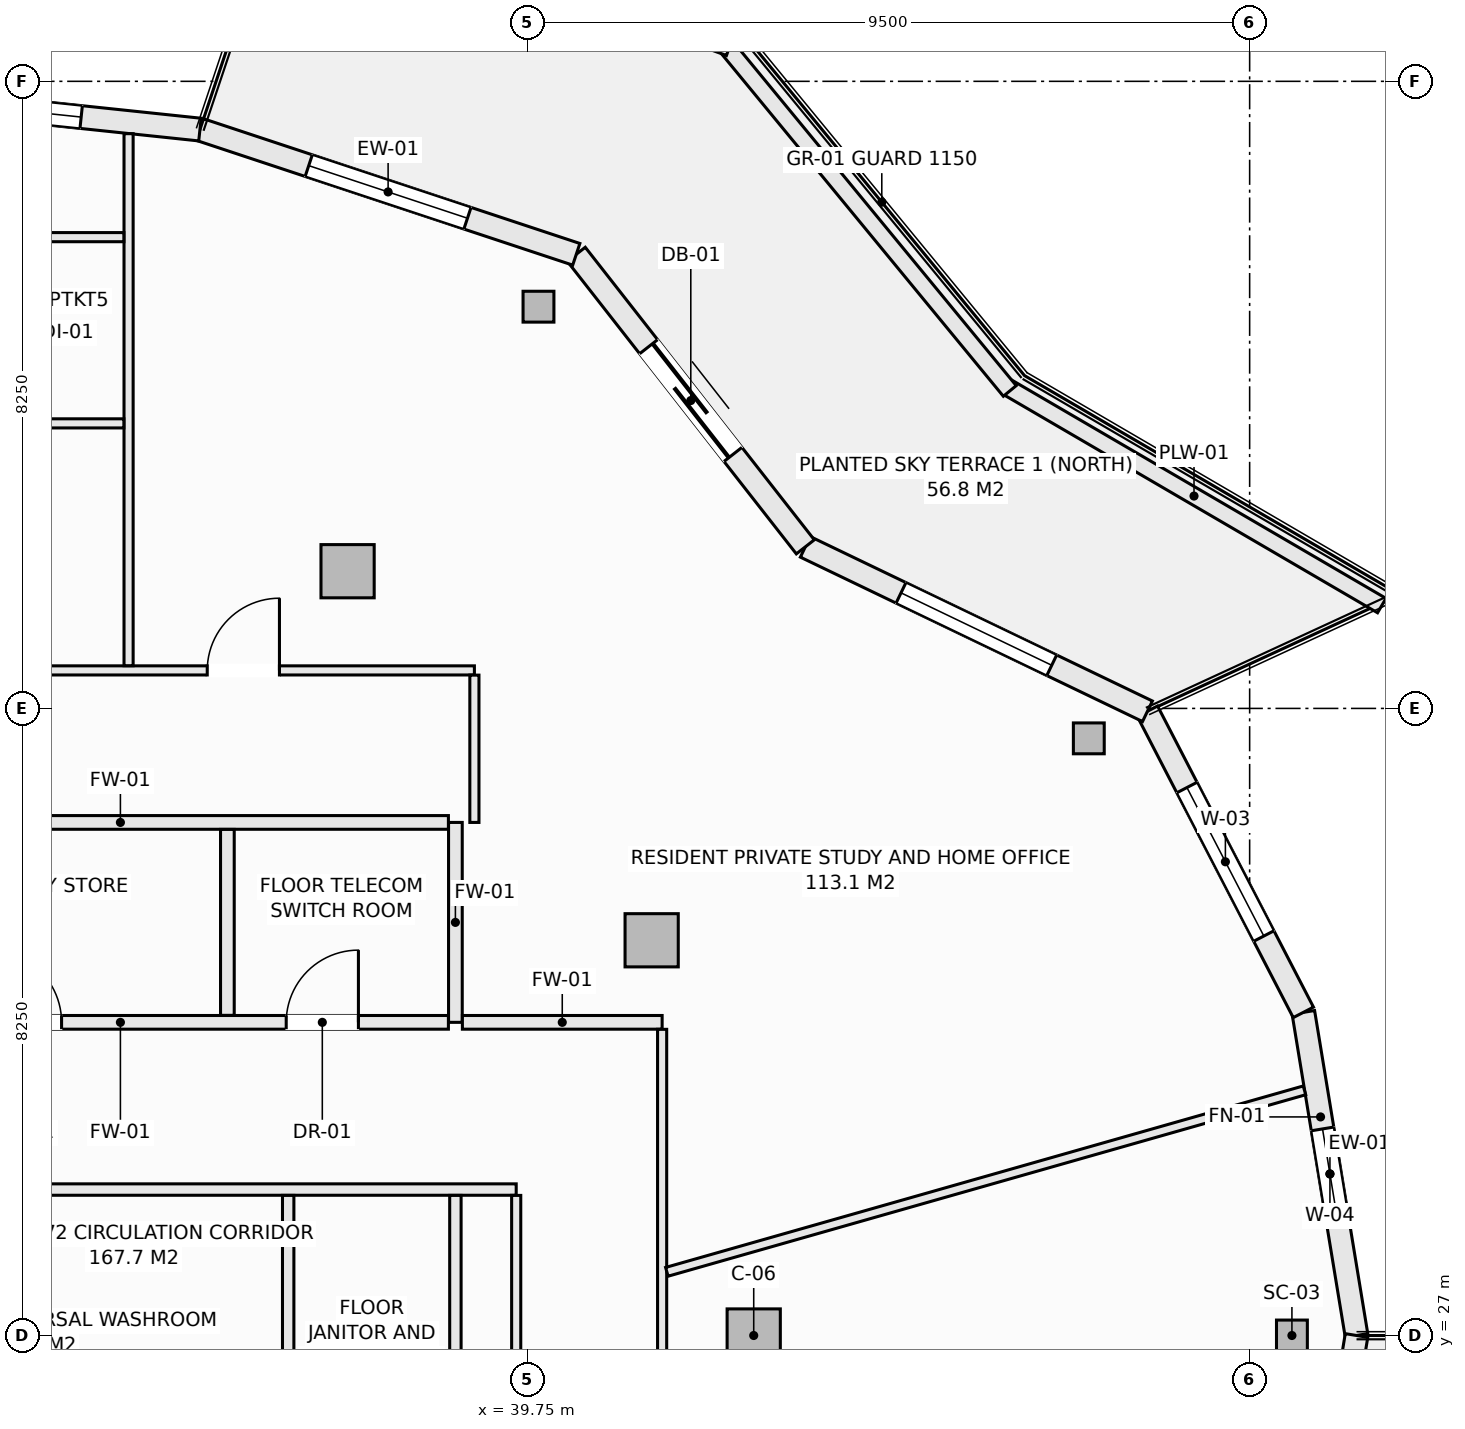
"""IFC4 building model, lengths in metres.
Left out: names, types, materials, properties, quantities, classifications, styles, units other than length and angle.
Written with IfcOpenShell. Run it as: python <this file> out.ifc"""

import sys

from ifc_helpers import new_model, si_unit, direction, frame, frame_2d, origin, origin_2d, place, context, subcontext, project, spatial, rectangle, hollow_rectangle, extrude, element, fill, save


model = new_model("IFC4")
c1 = context("Model", 3, precision=1e-05, world=origin(), true_north=direction((0.0, 1.0)))
c2 = subcontext(c1, "Body", "Model", "MODEL_VIEW")
j1 = project(units=[si_unit("LENGTHUNIT", "METRE"), si_unit("PLANEANGLEUNIT", "RADIAN")], contexts=[c1])
p1 = place(None, origin())
s1 = spatial("IfcSite", under=j1, at=p1, CompositionType="ELEMENT")
p2 = place(p1, origin())
s2 = spatial("IfcBuilding", under=s1, at=p2, CompositionType="ELEMENT")
p3 = place(p2, frame((0.0, 0.0, 265.7)))
s3 = spatial("IfcBuildingStorey", under=s2, at=p3, CompositionType="ELEMENT", Elevation=265.7)
for number, where, z_axis, x_axis in (
    (1, (49.806, 27.0, -0.27), (0.0, 0.0, 1.0), (1.0, 0.0, 0.0)),
    (2, (47.134, 34.856, -0.27), (0.0, 0.0, 1.0), (1.0, 0.0, 0.0)),
    (3, (39.893, 40.535, -0.27), (0.0, 0.0, 1.0), (1.0, 0.0, 0.0)),
):
    element("IfcColumn", number, at=place(p3, frame(where, z_axis=z_axis, x_axis=x_axis)), inside=s3, PredefinedType="COLUMN", context=c2, shape_type="SweptSolid", body=[
        extrude(hollow_rectangle(XDim=0.406, YDim=0.406, WallThickness=0.016, at=origin_2d()), origin(), (0.0, 0.0, 1.0), 3.3),
    ])
for number, where, z_axis, x_axis in (
    (4, (42.725, 27.0, -0.27), (0.0, 0.0, 1.0), (1.0, 0.0, 0.0)),
    (5, (41.382, 32.199, -0.27), (0.0, 0.0, 1.0), (1.0, 0.0, 0.0)),
    (6, (37.382, 37.055, -0.27), (0.0, 0.0, 1.0), (1.0, 0.0, 0.0)),
):
    element("IfcColumn", number, at=place(p3, frame(where, z_axis=z_axis, x_axis=x_axis)), inside=s3, PredefinedType="COLUMN", context=c2, shape_type="SweptSolid", body=[
        extrude(rectangle(XDim=0.7, YDim=0.7, at=origin_2d()), origin(), (0.0, 0.0, 1.0), 3.3),
    ])
p4 = place(p3, frame((49.957, 31.251, 0.0), z_axis=(0.0, 0.0, 1.0), x_axis=(0.162404622434, -0.98672424649, 0.0)))
e7 = element("IfcWall", 7, at=p4, inside=s3, PredefinedType="SOLIDWALL", context=c2, shape_type="SweptSolid", body=[
    extrude(rectangle(XDim=4.308, YDim=0.3, at=frame_2d((2.154, 0.0))), origin(), (0.0, 0.0, 1.0), 2.605),
])
p5 = place(p4, frame((1.554, 0.0, 0.72)))
e8 = element("IfcOpeningElement", 8, at=p5, cuts=e7, PredefinedType="OPENING", context=c2, shape_type="SweptSolid", body=[
    extrude(rectangle(XDim=1.2, YDim=1.65, at=frame_2d((0.6, 0.825))), frame((0.0, 0.16, 0.0), z_axis=(0.0, -1.0, 0.0), x_axis=(1.0, 0.0, 0.0)), (0.0, 0.0, 1.0), 0.32),
])
p6 = place(p3, frame((47.906, 35.212, 0.0), z_axis=(0.0, 0.0, 1.0), x_axis=(0.459801070243, -0.888021945564, 0.0)))
e9 = element("IfcWall", 9, at=p6, inside=s3, PredefinedType="SOLIDWALL", context=c2, shape_type="SweptSolid", body=[
    extrude(rectangle(XDim=4.461, YDim=0.3, at=frame_2d((2.23, 0.0))), origin(), (0.0, 0.0, 1.0), 2.605),
])
p7 = place(p6, frame((1.13, 0.0, 0.72)))
e10 = element("IfcOpeningElement", 10, at=p7, cuts=e9, PredefinedType="OPENING", context=c2, shape_type="SweptSolid", body=[
    extrude(rectangle(XDim=2.2, YDim=1.65, at=frame_2d((1.1, 0.825))), frame((0.0, 0.16, 0.0), z_axis=(0.0, -1.0, 0.0), x_axis=(1.0, 0.0, 0.0)), (0.0, 0.0, 1.0), 0.32),
])
p8 = place(p3, frame((43.404, 37.375, 0.0), z_axis=(0.0, 0.0, 1.0), x_axis=(0.901346013132, -0.433099716706, 0.0)))
e11 = element("IfcWall", 11, at=p8, inside=s3, PredefinedType="SOLIDWALL", context=c2, shape_type="SweptSolid", body=[
    extrude(rectangle(XDim=4.994, YDim=0.3, at=frame_2d((2.497, 0.0))), origin(), (0.0, 0.0, 1.0), 2.605),
])
p9 = place(p8, frame((1.397, 0.0, 0.72)))
e12 = element("IfcOpeningElement", 12, at=p9, cuts=e11, PredefinedType="OPENING", context=c2, shape_type="SweptSolid", body=[
    extrude(rectangle(XDim=2.2, YDim=1.65, at=frame_2d((1.1, 0.825))), frame((0.0, 0.16, 0.0), z_axis=(0.0, -1.0, 0.0), x_axis=(1.0, 0.0, 0.0)), (0.0, 0.0, 1.0), 0.32),
])
p10 = place(p3, frame((40.391, 41.225, 0.0), z_axis=(0.0, 0.0, 1.0), x_axis=(0.616413297421, -0.78742278781, 0.0)))
e13 = element("IfcWall", 13, at=p10, inside=s3, PredefinedType="SOLIDWALL", context=c2, shape_type="SweptSolid", body=[
    extrude(rectangle(XDim=4.888, YDim=0.3, at=frame_2d((2.444, 0.0))), origin(), (0.0, 0.0, 1.0), 2.605),
])
p11 = place(p10, frame((1.544, 0.0, 0.0)))
e14 = element("IfcOpeningElement", 14, at=p11, cuts=e13, PredefinedType="OPENING", context=c2, shape_type="SweptSolid", body=[
    extrude(rectangle(XDim=1.8, YDim=2.25, at=frame_2d((0.9, 1.125))), frame((0.0, 0.16, 0.0), z_axis=(0.0, -1.0, 0.0), x_axis=(1.0, 0.0, 0.0)), (0.0, 0.0, 1.0), 0.32),
])
p12 = place(p3, frame((35.439, 42.865, 0.0), z_axis=(0.0, 0.0, 1.0), x_axis=(0.949252744709, -0.314514271001, 0.0)))
e15 = element("IfcWall", 15, at=p12, inside=s3, PredefinedType="SOLIDWALL", context=c2, shape_type="SweptSolid", body=[
    extrude(rectangle(XDim=5.216, YDim=0.3, at=frame_2d((2.608, 0.0))), origin(), (0.0, 0.0, 1.0), 2.605),
])
p13 = place(p12, frame((1.508, 0.0, 0.72)))
e16 = element("IfcOpeningElement", 16, at=p13, cuts=e15, PredefinedType="OPENING", context=c2, shape_type="SweptSolid", body=[
    extrude(rectangle(XDim=2.2, YDim=1.65, at=frame_2d((1.1, 0.825))), frame((0.0, 0.16, 0.0), z_axis=(0.0, -1.0, 0.0), x_axis=(1.0, 0.0, 0.0)), (0.0, 0.0, 1.0), 0.32),
])
p14 = place(p3, frame((30.125, 43.425, 0.0), z_axis=(0.0, 0.0, 1.0), x_axis=(0.9944966869, -0.104768028258, 0.0)))
e17 = element("IfcWall", 17, at=p14, inside=s3, PredefinedType="SOLIDWALL", context=c2, shape_type="SweptSolid", body=[
    extrude(rectangle(XDim=5.343, YDim=0.3, at=frame_2d((2.672, 0.0))), origin(), (0.0, 0.0, 1.0), 2.605),
])
p15 = place(p14, frame((1.572, 0.0, 0.72)))
e18 = element("IfcOpeningElement", 18, at=p15, cuts=e17, PredefinedType="OPENING", context=c2, shape_type="SweptSolid", body=[
    extrude(rectangle(XDim=2.2, YDim=1.65, at=frame_2d((1.1, 0.825))), frame((0.0, 0.16, 0.0), z_axis=(0.0, -1.0, 0.0), x_axis=(1.0, 0.0, 0.0)), (0.0, 0.0, 1.0), 0.32),
])
p16 = place(p3, frame((49.957, 22.749, 0.0), z_axis=(0.0, 0.0, 1.0), x_axis=(0.162404622434, 0.98672424649, 0.0)))
e19 = element("IfcWall", 19, at=p16, inside=s3, PredefinedType="SOLIDWALL", context=c2, shape_type="SweptSolid", body=[
    extrude(rectangle(XDim=4.308, YDim=0.3, at=frame_2d((2.154, 0.0))), origin(), (0.0, 0.0, 1.0), 2.605),
])
p17 = place(p16, frame((1.054, 0.0, 0.72)))
e20 = element("IfcOpeningElement", 20, at=p17, cuts=e19, PredefinedType="OPENING", context=c2, shape_type="SweptSolid", body=[
    extrude(rectangle(XDim=2.2, YDim=1.65, at=frame_2d((1.1, 0.825))), frame((0.0, 0.16, 0.0), z_axis=(0.0, -1.0, 0.0), x_axis=(1.0, 0.0, 0.0)), (0.0, 0.0, 1.0), 0.32),
])
p18 = place(p3, frame((46.048, 39.485, 0.0), z_axis=(0.0, 0.0, 1.0), x_axis=(0.863803671285, -0.503828559606, 0.0)))
e21 = element("IfcWall", 21, at=p18, inside=s3, PredefinedType="PARAPET", context=c2, shape_type="SweptSolid", body=[
    extrude(rectangle(XDim=5.719, YDim=0.22, at=frame_2d((2.86, 0.0))), origin(), (0.0, 0.0, 1.0), 0.52),
])
p19 = place(p3, frame((42.339, 43.99, 0.0), z_axis=(0.0, 0.0, 1.0), x_axis=(0.635450933862, -0.772141250455, 0.0)))
e22 = element("IfcWall", 22, at=p19, inside=s3, PredefinedType="PARAPET", context=c2, shape_type="SweptSolid", body=[
    extrude(rectangle(XDim=5.91, YDim=0.22, at=frame_2d((2.955, 0.0))), origin(), (0.0, 0.0, 1.0), 0.52),
])
p20 = place(p3, frame((36.473, 46.087, 0.0), z_axis=(0.0, 0.0, 1.0), x_axis=(0.940465240036, -0.339889882585, 0.0)))
e23 = element("IfcWall", 23, at=p20, inside=s3, PredefinedType="PARAPET", context=c2, shape_type="SweptSolid", body=[
    extrude(rectangle(XDim=6.307, YDim=0.22, at=frame_2d((3.153, 0.0))), origin(), (0.0, 0.0, 1.0), 0.52),
])
p21 = place(p3, frame((30.077, 28.92, 0.0), z_axis=(0.0, 0.0, 1.0), x_axis=(1.0, 0.0, 0.0)))
e24 = element("IfcWall", 24, at=p21, inside=s3, PredefinedType="PARTITIONING", context=c2, shape_type="SweptSolid", body=[
    extrude(rectangle(XDim=9.523, YDim=0.15, at=frame_2d((4.762, 0.0))), origin(), (0.0, 0.0, 1.0), 3.03),
])
for number, where, z_axis, x_axis in (
    (25, (36.6, 25.197, 0.0), (0.0, 0.0, 1.0), (0.0, 1.0, 0.0)),
    (26, (38.8, 25.197, 0.0), (0.0, 0.0, 1.0), (0.0, 1.0, 0.0)),
):
    element("IfcWall", number, at=place(p3, frame(where, z_axis=z_axis, x_axis=x_axis)), inside=s3, PredefinedType="PARTITIONING", context=c2, shape_type="SweptSolid", body=[
        extrude(rectangle(XDim=3.646, YDim=0.15, at=frame_2d((1.823, 0.0))), origin(), (0.0, 0.0, 1.0), 3.03),
    ])
p22 = place(p3, frame((38.8, 31.12, 0.0), z_axis=(0.0, 0.0, 1.0), x_axis=(0.0, 1.0, 0.0)))
e27 = element("IfcWall", 27, at=p22, inside=s3, PredefinedType="SOLIDWALL", context=c2, shape_type="SweptSolid", body=[
    extrude(rectangle(XDim=2.63, YDim=0.18, at=frame_2d((1.315, 0.0))), origin(), (0.0, 0.0, 1.0), 3.03),
])
p23 = place(p3, frame((30.077, 31.12, 0.0), z_axis=(0.0, 0.0, 1.0), x_axis=(1.0, 0.0, 0.0)))
e28 = element("IfcWall", 28, at=p23, inside=s3, PredefinedType="SOLIDWALL", context=c2, shape_type="SweptSolid", body=[
    extrude(rectangle(XDim=8.631, YDim=0.18, at=frame_2d((4.315, 0.0))), origin(), (0.0, 0.0, 1.0), 3.03),
])
p24 = place(p23, frame((2.592, 0.0, 0.0)))
e29 = element("IfcOpeningElement", 29, at=p24, cuts=e28, PredefinedType="OPENING", context=c2, shape_type="SweptSolid", body=[
    extrude(rectangle(XDim=0.95, YDim=2.1, at=frame_2d((0.475, 1.05))), frame((0.0, 0.1, 0.0), z_axis=(0.0, -1.0, 0.0), x_axis=(1.0, 0.0, 0.0)), (0.0, 0.0, 1.0), 0.2),
])
p25 = place(p23, frame((6.497, 0.0, 0.0)))
e30 = element("IfcOpeningElement", 30, at=p25, cuts=e28, PredefinedType="OPENING", context=c2, shape_type="SweptSolid", body=[
    extrude(rectangle(XDim=0.95, YDim=2.1, at=frame_2d((0.475, 1.05))), frame((0.0, 0.1, 0.0), z_axis=(0.0, -1.0, 0.0), x_axis=(1.0, 0.0, 0.0)), (0.0, 0.0, 1.0), 0.2),
])
p26 = place(p3, frame((38.892, 31.12, 0.0), z_axis=(0.0, 0.0, 1.0), x_axis=(1.0, 0.0, 0.0)))
e31 = element("IfcWall", 31, at=p26, inside=s3, PredefinedType="SOLIDWALL", context=c2, shape_type="SweptSolid", body=[
    extrude(rectangle(XDim=2.628, YDim=0.18, at=frame_2d((1.314, 0.0))), origin(), (0.0, 0.0, 1.0), 3.03),
])
p27 = place(p3, frame((30.077, 33.75, 0.0), z_axis=(0.0, 0.0, 1.0), x_axis=(1.0, 0.0, 0.0)))
e32 = element("IfcWall", 32, at=p27, inside=s3, PredefinedType="SOLIDWALL", context=c2, shape_type="SweptSolid", body=[
    extrude(rectangle(XDim=8.631, YDim=0.18, at=frame_2d((4.315, 0.0))), origin(), (0.0, 0.0, 1.0), 3.03),
])
p28 = place(p3, frame((35.8, 31.212, 0.0), z_axis=(0.0, 0.0, 1.0), x_axis=(0.0, 1.0, 0.0)))
e33 = element("IfcWall", 33, at=p28, inside=s3, PredefinedType="SOLIDWALL", context=c2, shape_type="SweptSolid", body=[
    extrude(rectangle(XDim=2.446, YDim=0.18, at=frame_2d((1.223, 0.0))), origin(), (0.0, 0.0, 1.0), 3.03),
])
p29 = place(p3, frame((30.062, 35.75, 0.0), z_axis=(0.0, 0.0, 1.0), x_axis=(1.0, 0.0, 0.0)))
e34 = element("IfcWall", 34, at=p29, inside=s3, PredefinedType="PARTITIONING", context=c2, shape_type="SweptSolid", body=[
    extrude(rectangle(XDim=8.988, YDim=0.12, at=frame_2d((4.494, 0.0))), origin(), (0.0, 0.0, 1.0), 2.478),
])
p30 = place(p29, frame((5.473, 0.0, 0.0)))
e35 = element("IfcOpeningElement", 35, at=p30, cuts=e34, PredefinedType="OPENING", context=c2, shape_type="SweptSolid", body=[
    extrude(rectangle(XDim=0.95, YDim=2.1, at=frame_2d((0.475, 1.05))), frame((0.0, 0.07, 0.0), z_axis=(0.0, -1.0, 0.0), x_axis=(1.0, 0.0, 0.0)), (0.0, 0.0, 1.0), 0.14),
])
p31 = place(p29, frame((1.949, 0.0, 0.0)))
e36 = element("IfcOpeningElement", 36, at=p31, cuts=e34, PredefinedType="OPENING", context=c2, shape_type="SweptSolid", body=[
    extrude(rectangle(XDim=0.95, YDim=2.1, at=frame_2d((0.475, 1.05))), frame((0.0, 0.07, 0.0), z_axis=(0.0, -1.0, 0.0), x_axis=(1.0, 0.0, 0.0)), (0.0, 0.0, 1.0), 0.14),
])
p32 = place(p3, frame((39.05, 33.75, 0.0), z_axis=(0.0, 0.0, 1.0), x_axis=(0.0, 1.0, 0.0)))
e37 = element("IfcWall", 37, at=p32, inside=s3, PredefinedType="PARTITIONING", context=c2, shape_type="SweptSolid", body=[
    extrude(rectangle(XDim=1.938, YDim=0.12, at=frame_2d((0.969, 0.0))), origin(), (0.0, 0.0, 1.0), 3.03),
])
p33 = place(p3, frame((41.52, 23.02, 0.0), z_axis=(0.0, 0.0, 1.0), x_axis=(0.0, 1.0, 0.0)))
e38 = element("IfcWall", 38, at=p33, inside=s3, PredefinedType="PARTITIONING", context=c2, shape_type="SweptSolid", body=[
    extrude(rectangle(XDim=8.008, YDim=0.12, at=frame_2d((4.004, 0.0))), origin(), (0.0, 0.0, 1.0), 2.478),
])
p34 = place(p33, frame((2.135, 0.0, 0.0)))
e39 = element("IfcOpeningElement", 39, at=p34, cuts=e38, PredefinedType="OPENING", context=c2, shape_type="SweptSolid", body=[
    extrude(rectangle(XDim=0.95, YDim=2.1, at=frame_2d((0.475, 1.05))), frame((0.0, 0.07, 0.0), z_axis=(0.0, -1.0, 0.0), x_axis=(1.0, 0.0, 0.0)), (0.0, 0.0, 1.0), 0.14),
])
p35 = place(p3, frame((39.6, 25.197, 0.0), z_axis=(0.0, 0.0, 1.0), x_axis=(0.0, 1.0, 0.0)))
e40 = element("IfcWall", 40, at=p35, inside=s3, PredefinedType="PARTITIONING", context=c2, shape_type="SweptSolid", body=[
    extrude(rectangle(XDim=3.646, YDim=0.12, at=frame_2d((1.823, 0.0))), origin(), (0.0, 0.0, 1.0), 3.03),
])
p36 = place(p3, frame((34.5, 35.812, 0.0), z_axis=(0.0, 0.0, 1.0), x_axis=(0.0, 1.0, 0.0)))
e41 = element("IfcWall", 41, at=p36, inside=s3, PredefinedType="PARTITIONING", context=c2, shape_type="SweptSolid", body=[
    extrude(rectangle(XDim=6.999, YDim=0.12, at=frame_2d((3.5, 0.0))), origin(), (0.0, 0.0, 1.0), 2.77),
])
p37 = place(p3, frame((41.582, 27.838, 0.0), z_axis=(0.0, 0.0, 1.0), x_axis=(0.961811765236, 0.273711761262, 0.0)))
e42 = element("IfcWall", 42, at=p37, inside=s3, PredefinedType="PARTITIONING", context=c2, shape_type="SweptSolid", body=[
    extrude(rectangle(XDim=8.722, YDim=0.12, at=frame_2d((4.361, 0.0))), origin(), (0.0, 0.0, 1.0), 3.03),
])
p38 = place(p3, frame((32.25, 41.45, 0.0), z_axis=(0.0, 0.0, 1.0), x_axis=(1.0, 0.0, 0.0)))
e43 = element("IfcWall", 43, at=p38, inside=s3, PredefinedType="PARTITIONING", context=c2, shape_type="SweptSolid", body=[
    extrude(rectangle(XDim=2.188, YDim=0.12, at=frame_2d((1.094, 0.0))), origin(), (0.0, 0.0, 1.0), 3.03),
])
p39 = place(p3, frame((32.312, 39.0, 0.0), z_axis=(0.0, 0.0, 1.0), x_axis=(1.0, 0.0, 0.0)))
e44 = element("IfcWall", 44, at=p39, inside=s3, PredefinedType="PARTITIONING", context=c2, shape_type="SweptSolid", body=[
    extrude(rectangle(XDim=2.126, YDim=0.12, at=frame_2d((1.063, 0.0))), origin(), (0.0, 0.0, 1.0), 3.03),
])
p40 = place(p5, origin())
e45 = element("IfcWindow", 45, at=p40, inside=s3, PartitioningType="SINGLE_PANEL", PredefinedType="WINDOW", context=c2, shape_type="SweptSolid", body=[
    extrude(rectangle(XDim=1.2, YDim=1.65, at=frame_2d((0.6, 0.825))), frame((0.0, 0.03, 0.0), z_axis=(0.0, -1.0, 0.0), x_axis=(1.0, 0.0, 0.0)), (0.0, 0.0, 1.0), 0.06),
])
fill(e8, e45)
p41 = place(p7, origin())
e46 = element("IfcWindow", 46, at=p41, inside=s3, PartitioningType="SINGLE_PANEL", PredefinedType="WINDOW", context=c2, shape_type="SweptSolid", body=[
    extrude(rectangle(XDim=2.2, YDim=1.65, at=frame_2d((1.1, 0.825))), frame((0.0, 0.03, 0.0), z_axis=(0.0, -1.0, 0.0), x_axis=(1.0, 0.0, 0.0)), (0.0, 0.0, 1.0), 0.06),
])
fill(e10, e46)
p42 = place(p9, origin())
e47 = element("IfcWindow", 47, at=p42, inside=s3, PartitioningType="SINGLE_PANEL", PredefinedType="WINDOW", context=c2, shape_type="SweptSolid", body=[
    extrude(rectangle(XDim=2.2, YDim=1.65, at=frame_2d((1.1, 0.825))), frame((0.0, 0.03, 0.0), z_axis=(0.0, -1.0, 0.0), x_axis=(1.0, 0.0, 0.0)), (0.0, 0.0, 1.0), 0.06),
])
fill(e12, e47)
p43 = place(p11, origin())
e48 = element("IfcDoor", 48, at=p43, inside=s3, OperationType="SLIDING_TO_LEFT", PredefinedType="DOOR", context=c2, shape_type="SweptSolid", body=[
    extrude(rectangle(XDim=1.8, YDim=2.25, at=frame_2d((0.9, 1.125))), frame((0.0, 0.025, 0.0), z_axis=(0.0, -1.0, 0.0), x_axis=(1.0, 0.0, 0.0)), (0.0, 0.0, 1.0), 0.05),
])
fill(e14, e48)
p44 = place(p13, origin())
e49 = element("IfcWindow", 49, at=p44, inside=s3, PartitioningType="SINGLE_PANEL", PredefinedType="WINDOW", context=c2, shape_type="SweptSolid", body=[
    extrude(rectangle(XDim=2.2, YDim=1.65, at=frame_2d((1.1, 0.825))), frame((0.0, 0.03, 0.0), z_axis=(0.0, -1.0, 0.0), x_axis=(1.0, 0.0, 0.0)), (0.0, 0.0, 1.0), 0.06),
])
fill(e16, e49)
p45 = place(p15, origin())
e50 = element("IfcWindow", 50, at=p45, inside=s3, PartitioningType="SINGLE_PANEL", PredefinedType="WINDOW", context=c2, shape_type="SweptSolid", body=[
    extrude(rectangle(XDim=2.2, YDim=1.65, at=frame_2d((1.1, 0.825))), frame((0.0, 0.03, 0.0), z_axis=(0.0, -1.0, 0.0), x_axis=(1.0, 0.0, 0.0)), (0.0, 0.0, 1.0), 0.06),
])
fill(e18, e50)
p46 = place(p24, origin())
e51 = element("IfcDoor", 51, at=p46, inside=s3, OperationType="SINGLE_SWING_LEFT", PredefinedType="DOOR", context=c2, shape_type="SweptSolid", body=[
    extrude(rectangle(XDim=0.95, YDim=2.1, at=frame_2d((0.475, 1.05))), frame((0.0, 0.025, 0.0), z_axis=(0.0, -1.0, 0.0), x_axis=(1.0, 0.0, 0.0)), (0.0, 0.0, 1.0), 0.05),
])
fill(e29, e51)
p47 = place(p25, origin())
e52 = element("IfcDoor", 52, at=p47, inside=s3, OperationType="SINGLE_SWING_RIGHT", PredefinedType="DOOR", context=c2, shape_type="SweptSolid", body=[
    extrude(rectangle(XDim=0.95, YDim=2.1, at=frame_2d((0.475, 1.05))), frame((0.0, 0.025, 0.0), z_axis=(0.0, -1.0, 0.0), x_axis=(1.0, 0.0, 0.0)), (0.0, 0.0, 1.0), 0.05),
])
fill(e30, e52)
p48 = place(p30, origin())
e53 = element("IfcDoor", 53, at=p48, inside=s3, OperationType="SINGLE_SWING_RIGHT", PredefinedType="DOOR", context=c2, shape_type="SweptSolid", body=[
    extrude(rectangle(XDim=0.95, YDim=2.1, at=frame_2d((0.475, 1.05))), frame((0.0, 0.025, 0.0), z_axis=(0.0, -1.0, 0.0), x_axis=(1.0, 0.0, 0.0)), (0.0, 0.0, 1.0), 0.05),
])
fill(e35, e53)
save(model, sys.argv[1])
